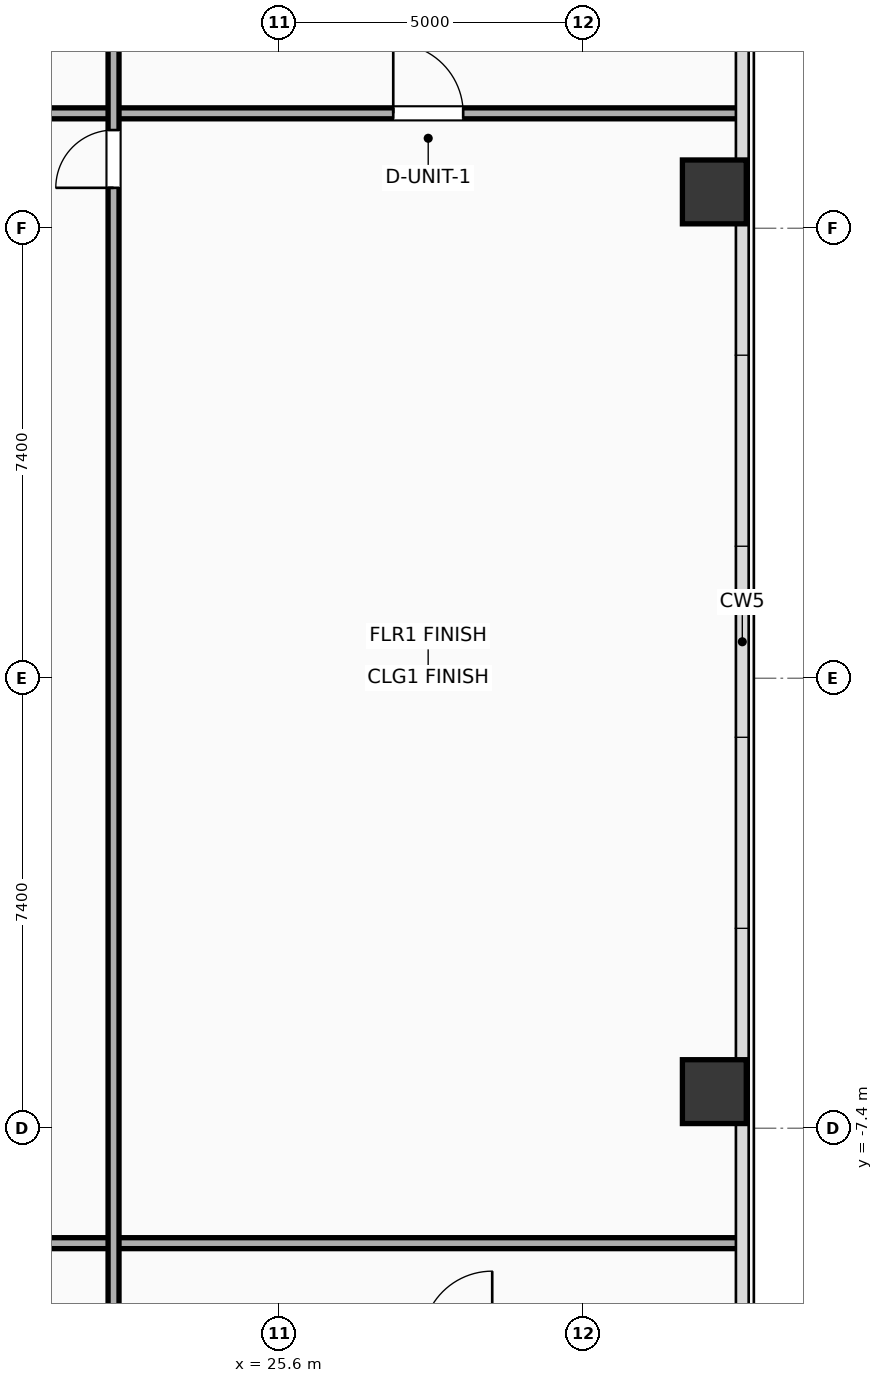
"""IFC4 building model, lengths in metres.
Left out: names, types, materials, properties, quantities, classifications, styles, units other than length and angle.
Written with IfcOpenShell. Run it as: python <this file> out.ifc"""

import sys

from ifc_helpers import new_model, si_unit, direction, frame, frame_2d, origin, origin_2d, place, context, subcontext, project, spatial, rectangle, hollow_rectangle, extrude, element, fill, save


model = new_model("IFC4")
c1 = context("Model", 3, precision=1e-05, world=origin(), true_north=direction((0.0, 1.0)))
c2 = subcontext(c1, "Body", "Model", "MODEL_VIEW")
j1 = project(units=[si_unit("LENGTHUNIT", "METRE"), si_unit("PLANEANGLEUNIT", "RADIAN")], contexts=[c1])
p1 = place(None, origin())
s1 = spatial("IfcSite", under=j1, at=p1, CompositionType="ELEMENT")
p2 = place(p1, origin())
s2 = spatial("IfcBuilding", under=s1, at=p2, CompositionType="ELEMENT")
p3 = place(p2, frame((0.0, 0.0, 89.7)))
s3 = spatial("IfcBuildingStorey", under=s2, at=p3, CompositionType="ELEMENT", Elevation=89.7)
for number, where, z_axis, x_axis in (
    (1, (32.75, -6.798, 0.0), (0.0, 0.0, 1.0), (1.0, 0.0, 0.0)),
    (2, (32.75, 7.998, 0.0), (0.0, 0.0, 1.0), (1.0, 0.0, 0.0)),
):
    element("IfcColumn", number, at=place(p3, frame(where, z_axis=z_axis, x_axis=x_axis)), inside=s3, PredefinedType="COLUMN", context=c2, shape_type="SweptSolid", body=[
        extrude(hollow_rectangle(XDim=1.05, YDim=1.05, WallThickness=0.036, at=origin_2d()), origin(), (0.0, 0.0, 1.0), 3.9),
    ])
p4 = place(p3, frame((9.88, 9.29, 0.0), z_axis=(0.0, 0.0, 1.0), x_axis=(1.0, 0.0, 0.0)))
e3 = element("IfcWall", 3, at=p4, inside=s3, PredefinedType="PARTITIONING", context=c2, shape_type="SweptSolid", body=[
    extrude(rectangle(XDim=23.33, YDim=0.18, at=frame_2d((11.665, 0.0))), origin(), (0.0, 0.0, 1.0), 3.65),
])
p5 = place(p4, frame((17.59, 0.0, 0.0)))
e4 = element("IfcOpeningElement", 4, at=p5, cuts=e3, PredefinedType="OPENING", context=c2, shape_type="SweptSolid", body=[
    extrude(rectangle(XDim=1.15, YDim=2.05, at=frame_2d((0.575, 1.025))), frame((0.0, 0.1, 0.0), z_axis=(0.0, -1.0, 0.0), x_axis=(1.0, 0.0, 0.0)), (0.0, 0.0, 1.0), 0.2),
])
p6 = place(p3, frame((9.88, -9.29, 0.0), z_axis=(0.0, 0.0, 1.0), x_axis=(1.0, 0.0, 0.0)))
e5 = element("IfcWall", 5, at=p6, inside=s3, PredefinedType="PARTITIONING", context=c2, shape_type="SweptSolid", body=[
    extrude(rectangle(XDim=23.33, YDim=0.18, at=frame_2d((11.665, 0.0))), origin(), (0.0, 0.0, 1.0), 3.65),
])
p7 = place(p3, frame((22.87, -10.95, 0.0), z_axis=(0.0, 0.0, 1.0), x_axis=(0.0, 1.0, 0.0)))
e6 = element("IfcWall", 6, at=p7, inside=s3, PredefinedType="PARTITIONING", context=c2, shape_type="SweptSolid", body=[
    extrude(rectangle(XDim=21.9, YDim=0.18, at=frame_2d((10.95, 0.0))), origin(), (0.0, 0.0, 1.0), 3.65),
])
p8 = place(p7, frame((19.015, 0.0, 0.0)))
e7 = element("IfcOpeningElement", 7, at=p8, cuts=e6, PredefinedType="OPENING", context=c2, shape_type="SweptSolid", body=[
    extrude(rectangle(XDim=0.95, YDim=2.05, at=frame_2d((0.475, 1.025))), frame((0.0, 0.1, 0.0), z_axis=(0.0, -1.0, 0.0), x_axis=(1.0, 0.0, 0.0)), (0.0, 0.0, 1.0), 0.2),
])
p9 = place(p5, origin())
e8 = element("IfcDoor", 8, at=p9, inside=s3, OperationType="SINGLE_SWING_LEFT", PredefinedType="DOOR", context=c2, shape_type="SweptSolid", body=[
    extrude(rectangle(XDim=1.15, YDim=2.05, at=frame_2d((0.575, 1.025))), frame((0.0, 0.025, 0.0), z_axis=(0.0, -1.0, 0.0), x_axis=(1.0, 0.0, 0.0)), (0.0, 0.0, 1.0), 0.05),
])
fill(e4, e8)
p10 = place(p8, origin())
e9 = element("IfcDoor", 9, at=p10, inside=s3, OperationType="SINGLE_SWING_LEFT", PredefinedType="DOOR", context=c2, shape_type="SweptSolid", body=[
    extrude(rectangle(XDim=0.95, YDim=2.05, at=frame_2d((0.475, 1.025))), frame((0.0, 0.025, 0.0), z_axis=(0.0, -1.0, 0.0), x_axis=(1.0, 0.0, 0.0)), (0.0, 0.0, 1.0), 0.05),
])
fill(e7, e9)
save(model, sys.argv[1])
